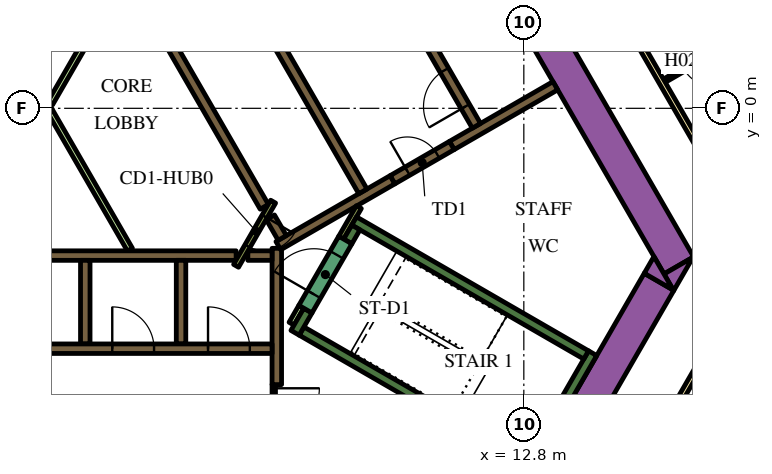
"""IFC4 building model, lengths in metres.
Left out: names, types, materials, properties, quantities, classifications, styles, units other than length and angle.
Written with IfcOpenShell. Run it as: python <this file> out.ifc"""

import sys

from ifc_helpers import new_model, si_unit, direction, frame, frame_2d, origin, place, context, subcontext, project, spatial, polyline, rectangle, outline, extrude, element, fill, save


model = new_model("IFC4")
c1 = context("Model", 3, precision=1e-05, world=origin(), true_north=direction((0.0, 1.0)))
c2 = subcontext(c1, "Body", "Model", "MODEL_VIEW")
j1 = project(units=[si_unit("LENGTHUNIT", "METRE"), si_unit("PLANEANGLEUNIT", "RADIAN")], contexts=[c1])
p1 = place(None, origin())
s1 = spatial("IfcSite", under=j1, at=p1, CompositionType="ELEMENT")
p2 = place(p1, origin())
s2 = spatial("IfcBuilding", under=s1, at=p2, CompositionType="ELEMENT")
p3 = place(p2, frame((0.0, 0.0, 43.2)))
s3 = spatial("IfcBuildingStorey", under=s2, at=p3, CompositionType="ELEMENT", Elevation=43.2)
p4 = place(p3, frame((6.776, 13.364, 0.0), z_axis=(0.0, 0.0, 1.0), x_axis=(0.500004177138, -0.8660229921, 0.0)))
e1 = element("IfcWall", 1, at=p4, inside=s3, PredefinedType="SOLIDWALL", context=c2, shape_type="SweptSolid", body=[
    extrude(rectangle(XDim=20.204, YDim=0.9, at=frame_2d((10.102, 0.0))), origin(), (0.0, 0.0, 1.0), 3.9),
])
p5 = place(p3, origin())
e2 = element("IfcWall", 2, at=p5, inside=s3, PredefinedType="SOLIDWALL", context=c2, shape_type="SweptSolid", body=[
    extrude(outline(polyline([(16.743, -4.8), (16.489, -4.36), (17.251, -3.92), (16.743, -4.8)])), origin(), (0.0, 0.0, 1.0), 3.9),
])
p6 = place(p3, frame((11.943, -12.214, 0.0), z_axis=(0.0, 0.0, 1.0), x_axis=(0.49998092645, 0.866036415623, 0.0)))
e3 = element("IfcWall", 3, at=p6, inside=s3, PredefinedType="SOLIDWALL", context=c2, shape_type="SweptSolid", body=[
    extrude(rectangle(XDim=8.83, YDim=0.9, at=frame_2d((4.415, 0.0))), origin(), (0.0, 0.0, 1.0), 3.9),
])
e4 = element("IfcWall", 4, at=p5, inside=s3, PredefinedType="SOLIDWALL", context=c2, shape_type="SweptSolid", body=[
    extrude(outline(polyline([(16.223, -3.9), (16.732, -4.78), (15.969, -4.34), (16.223, -3.9)])), origin(), (0.0, 0.0, 1.0), 3.9),
])
p7 = place(p3, frame((12.885, -9.431, 0.0), z_axis=(0.0, 0.0, 1.0), x_axis=(0.500020560727, 0.866013532718, 0.0)))
e5 = element("IfcWall", 5, at=p7, inside=s3, PredefinedType="SOLIDWALL", context=c2, shape_type="SweptSolid", body=[
    extrude(rectangle(XDim=3.45, YDim=0.25, at=frame_2d((1.725, 0.0))), origin(), (0.0, 0.0, 1.0), 3.9),
])
p8 = place(p3, frame((12.84, -9.261, 0.0), z_axis=(0.0, 0.0, 1.0), x_axis=(-0.866013990052, 0.500019768644, 0.0)))
e6 = element("IfcWall", 6, at=p8, inside=s3, PredefinedType="SOLIDWALL", context=c2, shape_type="SweptSolid", body=[
    extrude(rectangle(XDim=6.8, YDim=0.25, at=frame_2d((3.4, 0.0))), origin(), (0.0, 0.0, 1.0), 3.9),
])
p9 = place(p3, frame((6.78, -5.906, 0.0), z_axis=(0.0, 0.0, 1.0), x_axis=(0.500223362819, 0.865896406789, 0.0)))
e7 = element("IfcWall", 7, at=p9, inside=s3, PredefinedType="SOLIDWALL", context=c2, shape_type="SweptSolid", body=[
    extrude(rectangle(XDim=0.675, YDim=0.25, at=frame_2d((0.337, 0.0))), origin(), (0.0, 0.0, 1.0), 3.9),
])
p10 = place(p3, frame((8.334, -2.964, 0.0), z_axis=(0.0, 0.0, 1.0), x_axis=(0.866016039709, -0.500016218704, 0.0)))
e8 = element("IfcWall", 8, at=p10, inside=s3, PredefinedType="SOLIDWALL", context=c2, shape_type="SweptSolid", body=[
    extrude(rectangle(XDim=7.05, YDim=0.25, at=frame_2d((3.525, 0.0))), origin(), (0.0, 0.0, 1.0), 3.9),
])
p11 = place(p3, frame((8.168, -3.503, 0.0), z_axis=(0.0, 0.0, 1.0), x_axis=(0.49972245349, 0.866185586049, 0.0)))
e9 = element("IfcWall", 9, at=p11, inside=s3, PredefinedType="SOLIDWALL", context=c2, shape_type="SweptSolid", body=[
    extrude(rectangle(XDim=0.425, YDim=0.25, at=frame_2d((0.212, 0.0))), origin(), (0.0, 0.0, 1.0), 3.9),
])
p12 = place(p3, frame((-5.259, -3.875, 0.0), z_axis=(0.0, 0.0, 1.0), x_axis=(1.0, 0.0, 0.0)))
e10 = element("IfcWall", 10, at=p12, inside=s3, PredefinedType="SOLIDWALL", context=c2, shape_type="SweptSolid", body=[
    extrude(rectangle(XDim=10.489, YDim=0.25, at=frame_2d((5.244, 0.0))), origin(), (0.0, 0.0, 1.0), 3.9),
])
for number, where, z_axis, x_axis in (
    (11, (3.78, -4.0, 0.0), (0.0, 0.0, 1.0), (0.0, -1.0, 0.0)),
    (12, (1.26, -4.0, 0.0), (0.0, 0.0, 1.0), (0.0, -1.0, 0.0)),
):
    element("IfcWall", number, at=place(p3, frame(where, z_axis=z_axis, x_axis=x_axis)), inside=s3, PredefinedType="SOLIDWALL", context=c2, shape_type="SweptSolid", body=[
        extrude(rectangle(XDim=2.2, YDim=0.25, at=frame_2d((1.1, 0.0))), origin(), (0.0, 0.0, 1.0), 3.9),
    ])
p13 = place(p3, frame((6.3, -7.27, 0.0), z_axis=(0.0, 0.0, 1.0), x_axis=(0.0, 1.0, 0.0)))
e13 = element("IfcWall", 13, at=p13, inside=s3, PredefinedType="SOLIDWALL", context=c2, shape_type="SweptSolid", body=[
    extrude(rectangle(XDim=3.586, YDim=0.25, at=frame_2d((1.793, 0.0))), origin(), (0.0, 0.0, 1.0), 3.9),
])
p14 = place(p3, frame((5.538, -3.875, 0.0), z_axis=(0.0, 0.0, 1.0), x_axis=(1.0, 0.0, 0.0)))
e14 = element("IfcWall", 14, at=p14, inside=s3, PredefinedType="SOLIDWALL", context=c2, shape_type="SweptSolid", body=[
    extrude(rectangle(XDim=0.637, YDim=0.25, at=frame_2d((0.318, 0.0))), origin(), (0.0, 0.0, 1.0), 3.9),
])
p15 = place(p3, frame((13.629, 0.594, 0.0), z_axis=(0.0, 0.0, 1.0), x_axis=(-0.86602790099, -0.499995674689, 0.0)))
e15 = element("IfcWall", 15, at=p15, inside=s3, PredefinedType="SOLIDWALL", context=c2, shape_type="SweptSolid", body=[
    extrude(rectangle(XDim=3.146, YDim=0.25, at=frame_2d((1.573, 0.0))), origin(), (0.0, 0.0, 1.0), 3.9),
])
p16 = place(p3, frame((9.346, -1.879, 0.0), z_axis=(0.0, 0.0, 1.0), x_axis=(-0.866048528039, -0.499959945477, 0.0)))
e16 = element("IfcWall", 16, at=p16, inside=s3, PredefinedType="SOLIDWALL", context=c2, shape_type="SweptSolid", body=[
    extrude(rectangle(XDim=3.47, YDim=0.25, at=frame_2d((1.735, 0.0))), origin(), (0.0, 0.0, 1.0), 3.9),
])
p17 = place(p3, frame((6.13, -2.867, 0.0), z_axis=(0.0, 0.0, 1.0), x_axis=(0.500160776593, -0.865932559475, 0.0)))
e17 = element("IfcWall", 17, at=p17, inside=s3, PredefinedType="SOLIDWALL", context=c2, shape_type="SweptSolid", body=[
    extrude(rectangle(XDim=0.627, YDim=0.25, at=frame_2d((0.313, 0.0))), origin(), (0.0, 0.0, 1.0), 3.9),
])
p18 = place(p3, frame((5.97, -2.591, 0.0), z_axis=(0.0, 0.0, 1.0), x_axis=(-0.499994469932, 0.866028596547, 0.0)))
e18 = element("IfcWall", 18, at=p18, inside=s3, PredefinedType="SOLIDWALL", context=c2, shape_type="SweptSolid", body=[
    extrude(rectangle(XDim=10.488, YDim=0.25, at=frame_2d((5.244, 0.0))), origin(), (0.0, 0.0, 1.0), 3.9),
])
p19 = place(p3, frame((6.945, -5.222, 0.0), z_axis=(0.0, 0.0, 1.0), x_axis=(-0.499818422106, -0.866130212453, 0.0)))
e19 = element("IfcWall", 19, at=p19, inside=s3, PredefinedType="PARTITIONING", context=c2, shape_type="SweptSolid", body=[
    extrude(rectangle(XDim=0.514, YDim=0.15, at=frame_2d((0.257, 0.0))), origin(), (0.0, 0.0, 1.0), 2.75),
])
p20 = place(p3, frame((8.459, -2.599, 0.0), z_axis=(0.0, 0.0, 1.0), x_axis=(-0.500041054325, -0.866001699761, 0.0)))
e20 = element("IfcWall", 20, at=p20, inside=s3, PredefinedType="PARTITIONING", context=c2, shape_type="SweptSolid", body=[
    extrude(rectangle(XDim=0.929, YDim=0.15, at=frame_2d((0.464, 0.0))), origin(), (0.0, 0.0, 1.0), 3.9),
])
p21 = place(p3, frame((2.435, -3.718, 0.0), z_axis=(0.0, 0.0, 1.0), x_axis=(-0.499985176046, 0.866033962229, 0.0)))
e21 = element("IfcWall", 21, at=p21, inside=s3, PredefinedType="PARTITIONING", context=c2, shape_type="SweptSolid", body=[
    extrude(rectangle(XDim=8.875, YDim=0.15, at=frame_2d((4.438, 0.0))), origin(), (0.0, 0.0, 1.0), 2.75),
])
p22 = place(p3, frame((0.336, 0.132, 0.0), z_axis=(0.0, 0.0, 1.0), x_axis=(0.500001957507, 0.866024273614, 0.0)))
e22 = element("IfcWall", 22, at=p22, inside=s3, PredefinedType="PARTITIONING", context=c2, shape_type="SweptSolid", body=[
    extrude(rectangle(XDim=3.881, YDim=0.15, at=frame_2d((1.941, 0.0))), origin(), (0.0, 0.0, 1.0), 2.75),
])
p23 = place(p3, frame((-6.175, -6.325, 0.0), z_axis=(0.0, 0.0, 1.0), x_axis=(1.0, 0.0, 0.0)))
e23 = element("IfcWall", 23, at=p23, inside=s3, PredefinedType="SOLIDWALL", context=c2, shape_type="SweptSolid", body=[
    extrude(rectangle(XDim=12.35, YDim=0.25, at=frame_2d((6.175, 0.0))), origin(), (0.0, 0.0, 1.0), 3.9),
])
p24 = place(p23, frame((3.205, 0.0, 0.0)))
e24 = element("IfcOpeningElement", 24, at=p24, cuts=e23, PredefinedType="OPENING", context=c2, shape_type="SweptSolid", body=[
    extrude(rectangle(XDim=0.9, YDim=2.1, at=frame_2d((0.45, 1.05))), frame((0.0, 0.135, 0.0), z_axis=(0.0, -1.0, 0.0), x_axis=(1.0, 0.0, 0.0)), (0.0, 0.0, 1.0), 0.27),
])
p25 = place(p23, frame((8.145, 0.0, 0.0)))
e25 = element("IfcOpeningElement", 25, at=p25, cuts=e23, PredefinedType="OPENING", context=c2, shape_type="SweptSolid", body=[
    extrude(rectangle(XDim=1.1, YDim=2.1, at=frame_2d((0.55, 1.05))), frame((0.0, 0.135, 0.0), z_axis=(0.0, -1.0, 0.0), x_axis=(1.0, 0.0, 0.0)), (0.0, 0.0, 1.0), 0.27),
])
p26 = place(p23, frame((10.665, 0.0, 0.0)))
e26 = element("IfcOpeningElement", 26, at=p26, cuts=e23, PredefinedType="OPENING", context=c2, shape_type="SweptSolid", body=[
    extrude(rectangle(XDim=1.1, YDim=2.1, at=frame_2d((0.55, 1.05))), frame((0.0, 0.135, 0.0), z_axis=(0.0, -1.0, 0.0), x_axis=(1.0, 0.0, 0.0)), (0.0, 0.0, 1.0), 0.27),
])
p27 = place(p3, frame((11.553, -0.46, 0.0), z_axis=(0.0, 0.0, 1.0), x_axis=(-0.500006514828, 0.866021642414, 0.0)))
e27 = element("IfcWall", 27, at=p27, inside=s3, PredefinedType="SOLIDWALL", context=c2, shape_type="SweptSolid", body=[
    extrude(rectangle(XDim=12.35, YDim=0.25, at=frame_2d((6.175, 0.0))), origin(), (0.0, 0.0, 1.0), 3.9),
])
p28 = place(p27, frame((0.585, 0.0, 0.0)))
e28 = element("IfcOpeningElement", 28, at=p28, cuts=e27, PredefinedType="OPENING", context=c2, shape_type="SweptSolid", body=[
    extrude(rectangle(XDim=1.1, YDim=2.1, at=frame_2d((0.55, 1.05))), frame((0.0, 0.135, 0.0), z_axis=(0.0, -1.0, 0.0), x_axis=(1.0, 0.0, 0.0)), (0.0, 0.0, 1.0), 0.27),
])
p29 = place(p27, frame((3.105, 0.0, 0.0)))
e29 = element("IfcOpeningElement", 29, at=p29, cuts=e27, PredefinedType="OPENING", context=c2, shape_type="SweptSolid", body=[
    extrude(rectangle(XDim=1.1, YDim=2.1, at=frame_2d((0.55, 1.05))), frame((0.0, 0.135, 0.0), z_axis=(0.0, -1.0, 0.0), x_axis=(1.0, 0.0, 0.0)), (0.0, 0.0, 1.0), 0.27),
])
p30 = place(p27, frame((5.625, 0.0, 0.0)))
e30 = element("IfcOpeningElement", 30, at=p30, cuts=e27, PredefinedType="OPENING", context=c2, shape_type="SweptSolid", body=[
    extrude(rectangle(XDim=1.1, YDim=2.1, at=frame_2d((0.55, 1.05))), frame((0.0, 0.135, 0.0), z_axis=(0.0, -1.0, 0.0), x_axis=(1.0, 0.0, 0.0)), (0.0, 0.0, 1.0), 0.27),
])
p31 = place(p3, frame((8.565, -2.185, 0.0), z_axis=(0.0, 0.0, 1.0), x_axis=(-0.499997954832, 0.866026584559, 0.0)))
e31 = element("IfcWall", 31, at=p31, inside=s3, PredefinedType="SOLIDWALL", context=c2, shape_type="SweptSolid", body=[
    extrude(rectangle(XDim=12.35, YDim=0.25, at=frame_2d((6.175, 0.0))), origin(), (0.0, 0.0, 1.0), 3.9),
])
p32 = place(p31, frame((5.725, 0.0, 0.0)))
e32 = element("IfcOpeningElement", 32, at=p32, cuts=e31, PredefinedType="OPENING", context=c2, shape_type="SweptSolid", body=[
    extrude(rectangle(XDim=0.9, YDim=2.1, at=frame_2d((0.45, 1.05))), frame((0.0, 0.135, 0.0), z_axis=(0.0, -1.0, 0.0), x_axis=(1.0, 0.0, 0.0)), (0.0, 0.0, 1.0), 0.27),
])
p33 = place(p3, frame((7.053, -5.284, 0.0), z_axis=(0.0, 0.0, 1.0), x_axis=(0.500078061341, 0.865980330357, 0.0)))
e33 = element("IfcWall", 33, at=p33, inside=s3, PredefinedType="SOLIDWALL", context=c2, shape_type="SweptSolid", body=[
    extrude(rectangle(XDim=2.1, YDim=0.4, at=frame_2d((1.05, 0.0))), origin(), (0.0, 0.0, 1.0), 3.9),
])
p34 = place(p33, frame((0.45, 0.0, 0.0)))
e34 = element("IfcOpeningElement", 34, at=p34, cuts=e33, PredefinedType="OPENING", context=c2, shape_type="SweptSolid", body=[
    extrude(rectangle(XDim=1.2, YDim=2.1, at=frame_2d((0.6, 1.05))), frame((0.0, 0.21, 0.0), z_axis=(0.0, -1.0, 0.0), x_axis=(1.0, 0.0, 0.0)), (0.0, 0.0, 1.0), 0.42),
])
p35 = place(p3, frame((9.346, -1.879, 0.0), z_axis=(0.0, 0.0, 1.0), x_axis=(0.866047807691, 0.499961193289, 0.0)))
e35 = element("IfcWall", 35, at=p35, inside=s3, PredefinedType="SOLIDWALL", context=c2, shape_type="SweptSolid", body=[
    extrude(rectangle(XDim=1.8, YDim=0.25, at=frame_2d((0.9, 0.0))), origin(), (0.0, 0.0, 1.0), 3.9),
])
p36 = place(p35, frame((0.45, 0.0, 0.0)))
e36 = element("IfcOpeningElement", 36, at=p36, cuts=e35, PredefinedType="OPENING", context=c2, shape_type="SweptSolid", body=[
    extrude(rectangle(XDim=0.9, YDim=2.1, at=frame_2d((0.45, 1.05))), frame((0.0, 0.135, 0.0), z_axis=(0.0, -1.0, 0.0), x_axis=(1.0, 0.0, 0.0)), (0.0, 0.0, 1.0), 0.27),
])
p37 = place(p3, frame((6.203, -2.456, 0.0), z_axis=(0.0, 0.0, 1.0), x_axis=(-0.500043961785, -0.866000020948, 0.0)))
e37 = element("IfcWall", 37, at=p37, inside=s3, PredefinedType="PARTITIONING", context=c2, shape_type="SweptSolid", body=[
    extrude(rectangle(XDim=1.95, YDim=0.15, at=frame_2d((0.975, 0.0))), origin(), (0.0, 0.0, 1.0), 3.9),
])
p38 = place(p37, frame((0.45, 0.0, 0.0)))
e38 = element("IfcOpeningElement", 38, at=p38, cuts=e37, PredefinedType="OPENING", context=c2, shape_type="SweptSolid", body=[
    extrude(rectangle(XDim=0.9, YDim=2.1, at=frame_2d((0.45, 1.05))), frame((0.0, 0.085, 0.0), z_axis=(0.0, -1.0, 0.0), x_axis=(1.0, 0.0, 0.0)), (0.0, 0.0, 1.0), 0.17),
])
p39 = place(p3, frame((6.22, -7.266, 0.0), z_axis=(0.0, 0.0, 1.0), x_axis=(0.0, -1.0, 0.0)))
e39 = element("IfcWall", 39, at=p39, inside=s3, PredefinedType="PARTITIONING", context=c2, shape_type="SweptSolid", body=[
    extrude(rectangle(XDim=1.4, YDim=0.09, at=frame_2d((0.7, 0.0))), origin(), (0.0, 0.0, 1.0), 2.75),
])
p40 = place(p39, frame((0.1, 0.0, 0.0)))
e40 = element("IfcOpeningElement", 40, at=p40, cuts=e39, PredefinedType="OPENING", context=c2, shape_type="SweptSolid", body=[
    extrude(rectangle(XDim=1.2, YDim=2.1, at=frame_2d((0.6, 1.05))), frame((0.0, 0.055, 0.0), z_axis=(0.0, -1.0, 0.0), x_axis=(1.0, 0.0, 0.0)), (0.0, 0.0, 1.0), 0.11),
])
p41 = place(p3, frame((19.081, -3.9, 0.0), z_axis=(0.0, 0.0, 1.0), x_axis=(-0.499974327079, -0.866040225545, 0.0)))
e41 = element("IfcWall", 41, at=p41, inside=s3, PredefinedType="PARTITIONING", context=c2, shape_type="SweptSolid", body=[
    extrude(rectangle(XDim=5.258, YDim=0.15, at=frame_2d((2.629, 0.0))), origin(), (0.0, 0.0, 1.0), 2.75),
])
p42 = place(p3, frame((6.163, 18.475, 0.0), z_axis=(0.0, 0.0, 1.0), x_axis=(0.500001317485, -0.866024643133, 0.0)))
e42 = element("IfcWall", 42, at=p42, inside=s3, PredefinedType="PARTITIONING", context=c2, shape_type="SweptSolid", body=[
    extrude(rectangle(XDim=25.767, YDim=0.15, at=frame_2d((12.883, 0.0))), origin(), (0.0, 0.0, 1.0), 2.75),
])
p43 = place(p42, frame((24.586, 0.0, 0.0)))
e43 = element("IfcOpeningElement", 43, at=p43, cuts=e42, PredefinedType="OPENING", context=c2, shape_type="SweptSolid", body=[
    extrude(rectangle(XDim=1.0, YDim=2.1, at=frame_2d((0.5, 1.05))), frame((0.0, 0.085, 0.0), z_axis=(0.0, -1.0, 0.0), x_axis=(1.0, 0.0, 0.0)), (0.0, 0.0, 1.0), 0.17),
])
p44 = place(p42, frame((16.196, 0.0, 0.0)))
e44 = element("IfcOpeningElement", 44, at=p44, cuts=e42, PredefinedType="OPENING", context=c2, shape_type="SweptSolid", body=[
    extrude(rectangle(XDim=1.0, YDim=2.1, at=frame_2d((0.5, 1.05))), frame((0.0, 0.085, 0.0), z_axis=(0.0, -1.0, 0.0), x_axis=(1.0, 0.0, 0.0)), (0.0, 0.0, 1.0), 0.17),
])
p45 = place(p42, frame((14.789, 0.0, 0.0)))
e45 = element("IfcOpeningElement", 45, at=p45, cuts=e42, PredefinedType="OPENING", context=c2, shape_type="SweptSolid", body=[
    extrude(rectangle(XDim=1.1, YDim=2.1, at=frame_2d((0.55, 1.05))), frame((0.0, 0.085, 0.0), z_axis=(0.0, -1.0, 0.0), x_axis=(1.0, 0.0, 0.0)), (0.0, 0.0, 1.0), 0.17),
])
p46 = place(p42, frame((3.698, 0.0, 0.0)))
e46 = element("IfcOpeningElement", 46, at=p46, cuts=e42, PredefinedType="OPENING", context=c2, shape_type="SweptSolid", body=[
    extrude(rectangle(XDim=1.0, YDim=2.1, at=frame_2d((0.5, 1.05))), frame((0.0, 0.085, 0.0), z_axis=(0.0, -1.0, 0.0), x_axis=(1.0, 0.0, 0.0)), (0.0, 0.0, 1.0), 0.17),
])
p47 = place(p42, frame((2.391, 0.0, 0.0)))
e47 = element("IfcOpeningElement", 47, at=p47, cuts=e42, PredefinedType="OPENING", context=c2, shape_type="SweptSolid", body=[
    extrude(rectangle(XDim=1.0, YDim=2.1, at=frame_2d((0.5, 1.05))), frame((0.0, 0.085, 0.0), z_axis=(0.0, -1.0, 0.0), x_axis=(1.0, 0.0, 0.0)), (0.0, 0.0, 1.0), 0.17),
])
p48 = place(p3, frame((27.134, -2.779, 0.0), z_axis=(0.0, 0.0, 1.0), x_axis=(-0.8882049501, -0.459447457951, 0.0)))
e48 = element("IfcWall", 48, at=p48, inside=s3, PredefinedType="PARTITIONING", context=c2, shape_type="SweptSolid", body=[
    extrude(rectangle(XDim=11.638, YDim=0.15, at=frame_2d((5.819, 0.0))), origin(), (0.0, 0.0, 1.0), 2.75),
])
p49 = place(p3, frame((18.749, 2.026, 0.0), z_axis=(0.0, 0.0, 1.0), x_axis=(-0.866021400173, -0.500006934395, 0.0)))
e49 = element("IfcWall", 49, at=p49, inside=s3, PredefinedType="PARTITIONING", context=c2, shape_type="SweptSolid", body=[
    extrude(rectangle(XDim=2.6, YDim=0.1, at=frame_2d((1.3, 0.0))), origin(), (0.0, 0.0, 1.0), 2.75),
])
p50 = place(p49, frame((1.1, 0.0, 0.0)))
e50 = element("IfcOpeningElement", 50, at=p50, cuts=e49, PredefinedType="OPENING", context=c2, shape_type="SweptSolid", body=[
    extrude(rectangle(XDim=0.9, YDim=2.1, at=frame_2d((0.45, 1.05))), frame((0.0, 0.06, 0.0), z_axis=(0.0, -1.0, 0.0), x_axis=(1.0, 0.0, 0.0)), (0.0, 0.0, 1.0), 0.12),
])
p51 = place(p25, origin())
e51 = element("IfcDoor", 51, at=p51, inside=s3, OperationType="DOUBLE_DOOR_SLIDING", PredefinedType="DOOR", context=c2, shape_type="SweptSolid", body=[
    extrude(rectangle(XDim=1.1, YDim=2.1, at=frame_2d((0.55, 1.05))), frame((0.0, 0.025, 0.0), z_axis=(0.0, -1.0, 0.0), x_axis=(1.0, 0.0, 0.0)), (0.0, 0.0, 1.0), 0.05),
])
fill(e25, e51)
p52 = place(p26, origin())
e52 = element("IfcDoor", 52, at=p52, inside=s3, OperationType="DOUBLE_DOOR_SLIDING", PredefinedType="DOOR", context=c2, shape_type="SweptSolid", body=[
    extrude(rectangle(XDim=1.1, YDim=2.1, at=frame_2d((0.55, 1.05))), frame((0.0, 0.025, 0.0), z_axis=(0.0, -1.0, 0.0), x_axis=(1.0, 0.0, 0.0)), (0.0, 0.0, 1.0), 0.05),
])
fill(e26, e52)
p53 = place(p28, origin())
e53 = element("IfcDoor", 53, at=p53, inside=s3, OperationType="DOUBLE_DOOR_SLIDING", PredefinedType="DOOR", context=c2, shape_type="SweptSolid", body=[
    extrude(rectangle(XDim=1.1, YDim=2.1, at=frame_2d((0.55, 1.05))), frame((0.0, 0.025, 0.0), z_axis=(0.0, -1.0, 0.0), x_axis=(1.0, 0.0, 0.0)), (0.0, 0.0, 1.0), 0.05),
])
fill(e28, e53)
p54 = place(p34, origin())
e54 = element("IfcDoor", 54, at=p54, inside=s3, OperationType="SINGLE_SWING_LEFT", PredefinedType="DOOR", context=c2, shape_type="SweptSolid", body=[
    extrude(rectangle(XDim=1.2, YDim=2.1, at=frame_2d((0.6, 1.05))), frame((0.0, 0.025, 0.0), z_axis=(0.0, -1.0, 0.0), x_axis=(1.0, 0.0, 0.0)), (0.0, 0.0, 1.0), 0.05),
])
fill(e34, e54)
p55 = place(p36, origin())
e55 = element("IfcDoor", 55, at=p55, inside=s3, OperationType="SINGLE_SWING_LEFT", PredefinedType="DOOR", context=c2, shape_type="SweptSolid", body=[
    extrude(rectangle(XDim=0.9, YDim=2.1, at=frame_2d((0.45, 1.05))), frame((0.0, 0.025, 0.0), z_axis=(0.0, -1.0, 0.0), x_axis=(1.0, 0.0, 0.0)), (0.0, 0.0, 1.0), 0.05),
])
fill(e36, e55)
p56 = place(p38, origin())
e56 = element("IfcDoor", 56, at=p56, inside=s3, OperationType="SINGLE_SWING_LEFT", PredefinedType="DOOR", context=c2, shape_type="SweptSolid", body=[
    extrude(rectangle(XDim=0.9, YDim=2.1, at=frame_2d((0.45, 1.05))), frame((0.0, 0.025, 0.0), z_axis=(0.0, -1.0, 0.0), x_axis=(1.0, 0.0, 0.0)), (0.0, 0.0, 1.0), 0.05),
])
fill(e38, e56)
p57 = place(p40, origin())
e57 = element("IfcDoor", 57, at=p57, inside=s3, OperationType="SINGLE_SWING_LEFT", PredefinedType="DOOR", context=c2, shape_type="SweptSolid", body=[
    extrude(rectangle(XDim=1.2, YDim=2.1, at=frame_2d((0.6, 1.05))), frame((0.0, 0.025, 0.0), z_axis=(0.0, -1.0, 0.0), x_axis=(1.0, 0.0, 0.0)), (0.0, 0.0, 1.0), 0.05),
])
fill(e40, e57)
p58 = place(p50, origin())
e58 = element("IfcDoor", 58, at=p58, inside=s3, OperationType="SINGLE_SWING_LEFT", PredefinedType="DOOR", context=c2, shape_type="SweptSolid", body=[
    extrude(rectangle(XDim=0.9, YDim=2.1, at=frame_2d((0.45, 1.05))), frame((0.0, 0.025, 0.0), z_axis=(0.0, -1.0, 0.0), x_axis=(1.0, 0.0, 0.0)), (0.0, 0.0, 1.0), 0.05),
])
fill(e50, e58)
save(model, sys.argv[1])
